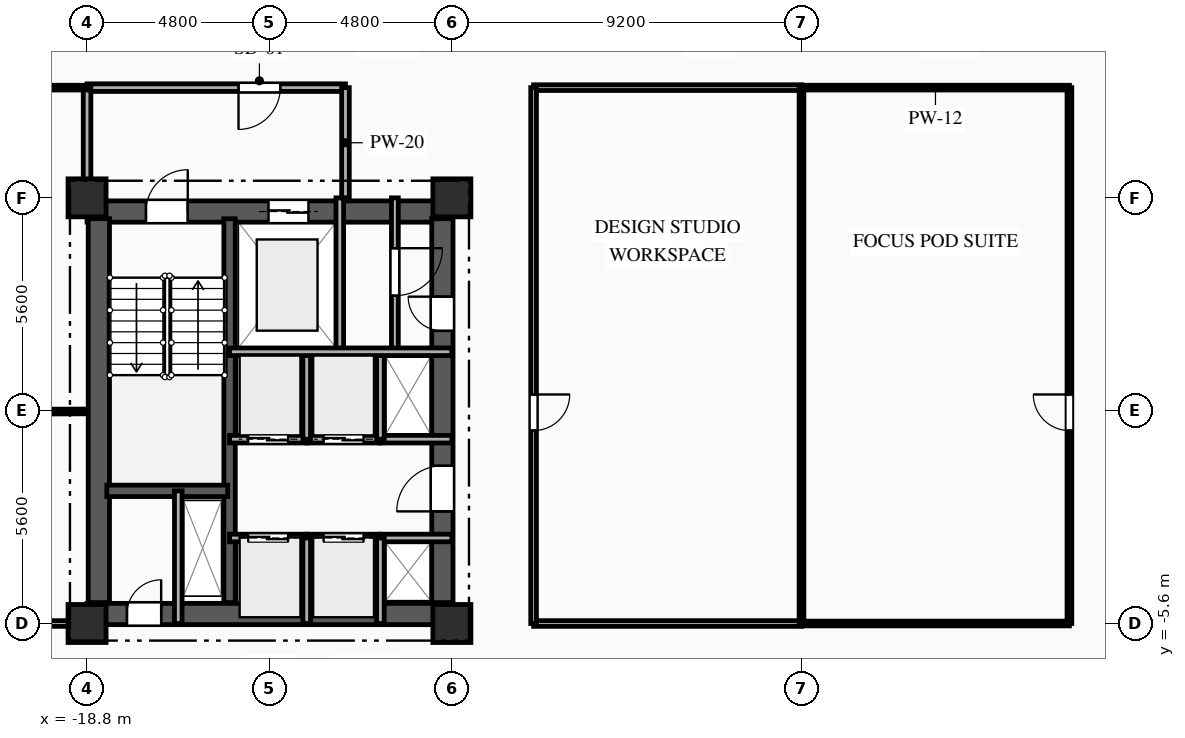
"""IFC4 building model, lengths in metres.
Left out: names, types, materials, properties, quantities, classifications, styles, units other than length and angle.
Written with IfcOpenShell. Run it as: python <this file> out.ifc"""

import sys

from ifc_helpers import new_model, si_unit, direction, frame, frame_2d, origin, origin_2d, place, context, subcontext, project, spatial, rectangle, extrude, element, fill, save


model = new_model("IFC4")
c1 = context("Model", 3, precision=1e-05, world=origin(), true_north=direction((0.0, 1.0)))
c2 = subcontext(c1, "Body", "Model", "MODEL_VIEW")
j1 = project(units=[si_unit("LENGTHUNIT", "METRE"), si_unit("PLANEANGLEUNIT", "RADIAN")], contexts=[c1])
p1 = place(None, origin())
s1 = spatial("IfcSite", under=j1, at=p1, CompositionType="ELEMENT")
p2 = place(p1, origin())
s2 = spatial("IfcBuilding", under=s1, at=p2, CompositionType="ELEMENT")
p3 = place(p2, frame((0.0, 0.0, 109.15)))
s3 = spatial("IfcBuildingStorey", under=s2, at=p3, CompositionType="ELEMENT", Elevation=109.15)
for number, where, z_axis, x_axis in (
    (1, (-18.8, -5.6, 0.0), (0.0, 0.0, 1.0), (1.0, 0.0, 0.0)),
    (2, (-18.8, 5.6, 0.0), (0.0, 0.0, 1.0), (1.0, 0.0, 0.0)),
    (3, (-9.2, -5.6, 0.0), (0.0, 0.0, 1.0), (1.0, 0.0, 0.0)),
    (4, (-9.2, 5.6, 0.0), (0.0, 0.0, 1.0), (1.0, 0.0, 0.0)),
):
    element("IfcColumn", number, at=place(p3, frame(where, z_axis=z_axis, x_axis=x_axis)), inside=s3, PredefinedType="COLUMN", context=c2, shape_type="SweptSolid", body=[
        extrude(rectangle(XDim=1.0, YDim=1.0, at=origin_2d()), origin(), (0.0, 0.0, 1.0), 3.35),
    ])
p4 = place(p3, frame((-18.8, 5.24, 0.0), z_axis=(0.0, 0.0, 1.0), x_axis=(1.0, 0.0, 0.0)))
e5 = element("IfcWall", 5, at=p4, inside=s3, PredefinedType="SHEAR", context=c2, shape_type="SweptSolid", body=[
    extrude(rectangle(XDim=9.6, YDim=0.56, at=frame_2d((4.8, 0.0))), origin(), (0.0, 0.0, 1.0), 3.045),
])
p5 = place(p4, frame((1.55, 0.0, 0.0)))
e6 = element("IfcOpeningElement", 6, at=p5, cuts=e5, PredefinedType="OPENING", context=c2, shape_type="SweptSolid", body=[
    extrude(rectangle(XDim=1.1, YDim=2.15, at=frame_2d((0.55, 1.075))), frame((0.0, 0.29, 0.0), z_axis=(0.0, -1.0, 0.0), x_axis=(1.0, 0.0, 0.0)), (0.0, 0.0, 1.0), 0.58),
])
p6 = place(p4, frame((4.775, 0.0, 0.0)))
e7 = element("IfcOpeningElement", 7, at=p6, cuts=e5, PredefinedType="OPENING", context=c2, shape_type="SweptSolid", body=[
    extrude(rectangle(XDim=1.05, YDim=2.1, at=frame_2d((0.525, 1.05))), frame((0.0, 0.29, 0.0), z_axis=(0.0, -1.0, 0.0), x_axis=(1.0, 0.0, 0.0)), (0.0, 0.0, 1.0), 0.58),
])
p7 = place(p3, frame((-18.8, -5.35, 0.0), z_axis=(0.0, 0.0, 1.0), x_axis=(1.0, 0.0, 0.0)))
e8 = element("IfcWall", 8, at=p7, inside=s3, PredefinedType="SHEAR", context=c2, shape_type="SweptSolid", body=[
    extrude(rectangle(XDim=9.6, YDim=0.56, at=frame_2d((4.8, 0.0))), origin(), (0.0, 0.0, 1.0), 3.045),
])
p8 = place(p7, frame((1.05, 0.0, 0.0)))
e9 = element("IfcOpeningElement", 9, at=p8, cuts=e8, PredefinedType="OPENING", context=c2, shape_type="SweptSolid", body=[
    extrude(rectangle(XDim=0.9, YDim=2.1, at=frame_2d((0.45, 1.05))), frame((0.0, 0.29, 0.0), z_axis=(0.0, -1.0, 0.0), x_axis=(1.0, 0.0, 0.0)), (0.0, 0.0, 1.0), 0.58),
])
p9 = place(p3, frame((-18.49, -5.05, 0.0), z_axis=(0.0, 0.0, 1.0), x_axis=(0.0, 1.0, 0.0)))
e10 = element("IfcWall", 10, at=p9, inside=s3, PredefinedType="SHEAR", context=c2, shape_type="SweptSolid", body=[
    extrude(rectangle(XDim=10.1, YDim=0.56, at=frame_2d((5.05, 0.0))), origin(), (0.0, 0.0, 1.0), 3.045),
])
p10 = place(p3, frame((-9.45, -5.05, 0.0), z_axis=(0.0, 0.0, 1.0), x_axis=(0.0, 1.0, 0.0)))
e11 = element("IfcWall", 11, at=p10, inside=s3, PredefinedType="SHEAR", context=c2, shape_type="SweptSolid", body=[
    extrude(rectangle(XDim=10.1, YDim=0.56, at=frame_2d((5.05, 0.0))), origin(), (0.0, 0.0, 1.0), 3.045),
])
p11 = place(p10, frame((7.15, 0.0, 0.0)))
e12 = element("IfcOpeningElement", 12, at=p11, cuts=e11, PredefinedType="OPENING", context=c2, shape_type="SweptSolid", body=[
    extrude(rectangle(XDim=0.9, YDim=2.1, at=frame_2d((0.45, 1.05))), frame((0.0, 0.29, 0.0), z_axis=(0.0, -1.0, 0.0), x_axis=(1.0, 0.0, 0.0)), (0.0, 0.0, 1.0), 0.58),
])
p12 = place(p10, frame((2.4, 0.0, 0.0)))
e13 = element("IfcOpeningElement", 13, at=p12, cuts=e11, PredefinedType="OPENING", context=c2, shape_type="SweptSolid", body=[
    extrude(rectangle(XDim=1.2, YDim=2.15, at=frame_2d((0.6, 1.075))), frame((0.0, 0.29, 0.0), z_axis=(0.0, -1.0, 0.0), x_axis=(1.0, 0.0, 0.0)), (0.0, 0.0, 1.0), 0.58),
])
p13 = place(p3, frame((-15.05, -5.05, 0.0), z_axis=(0.0, 0.0, 1.0), x_axis=(0.0, 1.0, 0.0)))
e14 = element("IfcWall", 14, at=p13, inside=s3, PredefinedType="SHEAR", context=c2, shape_type="SweptSolid", body=[
    extrude(rectangle(XDim=10.1, YDim=0.3, at=frame_2d((5.05, 0.0))), origin(), (0.0, 0.0, 1.0), 3.045),
])
p14 = place(p3, frame((-18.28, -2.11, 0.0), z_axis=(0.0, 0.0, 1.0), x_axis=(1.0, 0.0, 0.0)))
e15 = element("IfcWall", 15, at=p14, inside=s3, PredefinedType="SHEAR", context=c2, shape_type="SweptSolid", body=[
    extrude(rectangle(XDim=3.18, YDim=0.3, at=frame_2d((1.59, 0.0))), origin(), (0.0, 0.0, 1.0), 3.045),
])
p15 = place(p3, frame((-16.4, -5.6, 0.0), z_axis=(0.0, 0.0, 1.0), x_axis=(0.0, 1.0, 0.0)))
e16 = element("IfcWall", 16, at=p15, inside=s3, PredefinedType="PARTITIONING", context=c2, shape_type="SweptSolid", body=[
    extrude(rectangle(XDim=3.49, YDim=0.2, at=frame_2d((1.745, 0.0))), origin(), (0.0, 0.0, 1.0), 3.045),
])
p16 = place(p3, frame((-12.15, 1.55, 0.0), z_axis=(0.0, 0.0, 1.0), x_axis=(0.0, 1.0, 0.0)))
e17 = element("IfcWall", 17, at=p16, inside=s3, PredefinedType="PARTITIONING", context=c2, shape_type="SweptSolid", body=[
    extrude(rectangle(XDim=4.05, YDim=0.2, at=frame_2d((2.025, 0.0))), origin(), (0.0, 0.0, 1.0), 3.045),
])
p17 = place(p3, frame((-12.0, 8.5, 0.0), z_axis=(0.0, 0.0, 1.0), x_axis=(-1.0, 0.0, 0.0)))
e18 = element("IfcWall", 18, at=p17, inside=s3, PredefinedType="PARTITIONING", context=c2, shape_type="SweptSolid", body=[
    extrude(rectangle(XDim=6.8, YDim=0.2, at=frame_2d((3.4, 0.0))), origin(), (0.0, 0.0, 1.0), 3.045),
])
p18 = place(p17, frame((1.715, 0.0, 0.0)))
e19 = element("IfcOpeningElement", 19, at=p18, cuts=e18, PredefinedType="OPENING", context=c2, shape_type="SweptSolid", body=[
    extrude(rectangle(XDim=1.1, YDim=2.15, at=frame_2d((0.55, 1.075))), frame((0.0, 0.11, 0.0), z_axis=(0.0, -1.0, 0.0), x_axis=(1.0, 0.0, 0.0)), (0.0, 0.0, 1.0), 0.22),
])
p19 = place(p3, frame((-12.0, 5.6, 0.0), z_axis=(0.0, 0.0, 1.0), x_axis=(0.0, 1.0, 0.0)))
e20 = element("IfcWall", 20, at=p19, inside=s3, PredefinedType="PARTITIONING", context=c2, shape_type="SweptSolid", body=[
    extrude(rectangle(XDim=2.9, YDim=0.2, at=frame_2d((1.45, 0.0))), origin(), (0.0, 0.0, 1.0), 3.045),
])
p20 = place(p3, frame((-18.8, 8.5, 0.0), z_axis=(0.0, 0.0, 1.0), x_axis=(0.0, -1.0, 0.0)))
e21 = element("IfcWall", 21, at=p20, inside=s3, PredefinedType="PARTITIONING", context=c2, shape_type="SweptSolid", body=[
    extrude(rectangle(XDim=2.9, YDim=0.2, at=frame_2d((1.45, 0.0))), origin(), (0.0, 0.0, 1.0), 2.53),
])
p21 = place(p3, frame((-10.7, 5.6, 0.0), z_axis=(0.0, 0.0, 1.0), x_axis=(0.0, -1.0, 0.0)))
e22 = element("IfcWall", 22, at=p21, inside=s3, PredefinedType="PARTITIONING", context=c2, shape_type="SweptSolid", body=[
    extrude(rectangle(XDim=4.05, YDim=0.18, at=frame_2d((2.025, 0.0))), origin(), (0.0, 0.0, 1.0), 3.045),
])
p22 = place(p21, frame((1.325, 0.0, 0.0)))
e23 = element("IfcOpeningElement", 23, at=p22, cuts=e22, PredefinedType="OPENING", context=c2, shape_type="SweptSolid", body=[
    extrude(rectangle(XDim=1.25, YDim=2.2, at=frame_2d((0.625, 1.1))), frame((0.0, 0.1, 0.0), z_axis=(0.0, -1.0, 0.0), x_axis=(1.0, 0.0, 0.0)), (0.0, 0.0, 1.0), 0.2),
])
p23 = place(p3, frame((-15.05, -3.35, 0.0), z_axis=(0.0, 0.0, 1.0), x_axis=(1.0, 0.0, 0.0)))
e24 = element("IfcWall", 24, at=p23, inside=s3, PredefinedType="PARTITIONING", context=c2, shape_type="SweptSolid", body=[
    extrude(rectangle(XDim=2.03, YDim=0.2, at=frame_2d((1.015, 0.0))), origin(), (0.0, 0.0, 1.0), 3.045),
])
p24 = place(p23, frame((0.49, 0.0, 0.0)))
e25 = element("IfcOpeningElement", 25, at=p24, cuts=e24, PredefinedType="OPENING", context=c2, shape_type="SweptSolid", body=[
    extrude(rectangle(XDim=1.05, YDim=2.1, at=frame_2d((0.525, 1.05))), frame((0.0, 0.11, 0.0), z_axis=(0.0, -1.0, 0.0), x_axis=(1.0, 0.0, 0.0)), (0.0, 0.0, 1.0), 0.22),
])
p25 = place(p3, frame((-13.02, -3.35, 0.0), z_axis=(0.0, 0.0, 1.0), x_axis=(1.0, 0.0, 0.0)))
e26 = element("IfcWall", 26, at=p25, inside=s3, PredefinedType="PARTITIONING", context=c2, shape_type="SweptSolid", body=[
    extrude(rectangle(XDim=1.94, YDim=0.2, at=frame_2d((0.97, 0.0))), origin(), (0.0, 0.0, 1.0), 3.045),
])
p26 = place(p25, frame((0.445, 0.0, 0.0)))
e27 = element("IfcOpeningElement", 27, at=p26, cuts=e26, PredefinedType="OPENING", context=c2, shape_type="SweptSolid", body=[
    extrude(rectangle(XDim=1.05, YDim=2.1, at=frame_2d((0.525, 1.05))), frame((0.0, 0.11, 0.0), z_axis=(0.0, -1.0, 0.0), x_axis=(1.0, 0.0, 0.0)), (0.0, 0.0, 1.0), 0.22),
])
p27 = place(p3, frame((-11.08, -3.35, 0.0), z_axis=(0.0, 0.0, 1.0), x_axis=(1.0, 0.0, 0.0)))
e28 = element("IfcWall", 28, at=p27, inside=s3, PredefinedType="PARTITIONING", context=c2, shape_type="SweptSolid", body=[
    extrude(rectangle(XDim=1.88, YDim=0.2, at=frame_2d((0.94, 0.0))), origin(), (0.0, 0.0, 1.0), 2.76),
])
p28 = place(p3, frame((-13.02, -0.75, 0.0), z_axis=(0.0, 0.0, 1.0), x_axis=(-1.0, 0.0, 0.0)))
e29 = element("IfcWall", 29, at=p28, inside=s3, PredefinedType="PARTITIONING", context=c2, shape_type="SweptSolid", body=[
    extrude(rectangle(XDim=2.03, YDim=0.2, at=frame_2d((1.015, 0.0))), origin(), (0.0, 0.0, 1.0), 3.045),
])
p29 = place(p28, frame((0.49, 0.0, 0.0)))
e30 = element("IfcOpeningElement", 30, at=p29, cuts=e29, PredefinedType="OPENING", context=c2, shape_type="SweptSolid", body=[
    extrude(rectangle(XDim=1.05, YDim=2.1, at=frame_2d((0.525, 1.05))), frame((0.0, 0.11, 0.0), z_axis=(0.0, -1.0, 0.0), x_axis=(1.0, 0.0, 0.0)), (0.0, 0.0, 1.0), 0.22),
])
p30 = place(p3, frame((-11.08, -0.75, 0.0), z_axis=(0.0, 0.0, 1.0), x_axis=(-1.0, 0.0, 0.0)))
e31 = element("IfcWall", 31, at=p30, inside=s3, PredefinedType="PARTITIONING", context=c2, shape_type="SweptSolid", body=[
    extrude(rectangle(XDim=1.94, YDim=0.2, at=frame_2d((0.97, 0.0))), origin(), (0.0, 0.0, 1.0), 3.045),
])
p31 = place(p30, frame((0.445, 0.0, 0.0)))
e32 = element("IfcOpeningElement", 32, at=p31, cuts=e31, PredefinedType="OPENING", context=c2, shape_type="SweptSolid", body=[
    extrude(rectangle(XDim=1.05, YDim=2.1, at=frame_2d((0.525, 1.05))), frame((0.0, 0.11, 0.0), z_axis=(0.0, -1.0, 0.0), x_axis=(1.0, 0.0, 0.0)), (0.0, 0.0, 1.0), 0.22),
])
p32 = place(p3, frame((-9.2, -0.75, 0.0), z_axis=(0.0, 0.0, 1.0), x_axis=(-1.0, 0.0, 0.0)))
e33 = element("IfcWall", 33, at=p32, inside=s3, PredefinedType="PARTITIONING", context=c2, shape_type="SweptSolid", body=[
    extrude(rectangle(XDim=1.88, YDim=0.2, at=frame_2d((0.94, 0.0))), origin(), (0.0, 0.0, 1.0), 3.045),
])
for number, where, z_axis, x_axis in (
    (34, (-13.02, -5.6, 0.0), (0.0, 0.0, 1.0), (0.0, 1.0, 0.0)),
    (35, (-11.08, -5.6, 0.0), (0.0, 0.0, 1.0), (0.0, 1.0, 0.0)),
):
    element("IfcWall", number, at=place(p3, frame(where, z_axis=z_axis, x_axis=x_axis)), inside=s3, PredefinedType="PARTITIONING", context=c2, shape_type="SweptSolid", body=[
        extrude(rectangle(XDim=2.25, YDim=0.2, at=frame_2d((1.125, 0.0))), origin(), (0.0, 0.0, 1.0), 3.045),
    ])
for number, where, z_axis, x_axis in (
    (36, (-13.02, -0.75, 0.0), (0.0, 0.0, 1.0), (0.0, 1.0, 0.0)),
    (37, (-11.08, -0.75, 0.0), (0.0, 0.0, 1.0), (0.0, 1.0, 0.0)),
):
    element("IfcWall", number, at=place(p3, frame(where, z_axis=z_axis, x_axis=x_axis)), inside=s3, PredefinedType="PARTITIONING", context=c2, shape_type="SweptSolid", body=[
        extrude(rectangle(XDim=2.3, YDim=0.2, at=frame_2d((1.15, 0.0))), origin(), (0.0, 0.0, 1.0), 3.045),
    ])
p33 = place(p3, frame((-18.8, 8.5, 0.0), z_axis=(0.0, 0.0, 1.0), x_axis=(-1.0, 0.0, 0.0)))
e38 = element("IfcWall", 38, at=p33, inside=s3, PredefinedType="PARTITIONING", context=c2, shape_type="SweptSolid", body=[
    extrude(rectangle(XDim=4.2, YDim=0.125, at=frame_2d((2.1, 0.0))), origin(), (0.0, 0.0, 1.0), 3.045),
])
p34 = place(p33, frame((2.409, 0.0, 0.0)))
e39 = element("IfcOpeningElement", 39, at=p34, cuts=e38, PredefinedType="OPENING", context=c2, shape_type="SweptSolid", body=[
    extrude(rectangle(XDim=0.95, YDim=2.1, at=frame_2d((0.475, 1.05))), frame((0.0, 0.073, 0.0), z_axis=(0.0, -1.0, 0.0), x_axis=(1.0, 0.0, 0.0)), (0.0, 0.0, 1.0), 0.145),
])
p35 = place(p3, frame((0.0, 8.5, 0.0), z_axis=(0.0, 0.0, 1.0), x_axis=(-1.0, 0.0, 0.0)))
e40 = element("IfcWall", 40, at=p35, inside=s3, PredefinedType="PARTITIONING", context=c2, shape_type="SweptSolid", body=[
    extrude(rectangle(XDim=7.05, YDim=0.15, at=frame_2d((3.525, 0.0))), origin(), (0.0, 0.0, 1.0), 3.045),
])
p36 = place(p3, frame((7.05, 8.5, 0.0), z_axis=(0.0, 0.0, 1.0), x_axis=(-1.0, 0.0, 0.0)))
e41 = element("IfcWall", 41, at=p36, inside=s3, PredefinedType="PARTITIONING", context=c2, shape_type="SweptSolid", body=[
    extrude(rectangle(XDim=7.05, YDim=0.125, at=frame_2d((3.525, 0.0))), origin(), (0.0, 0.0, 1.0), 3.045),
])
p37 = place(p3, frame((-23.0, -5.6, 0.0), z_axis=(0.0, 0.0, 1.0), x_axis=(1.0, 0.0, 0.0)))
e42 = element("IfcWall", 42, at=p37, inside=s3, PredefinedType="PARTITIONING", context=c2, shape_type="SweptSolid", body=[
    extrude(rectangle(XDim=4.2, YDim=0.15, at=frame_2d((2.1, 0.0))), origin(), (0.0, 0.0, 1.0), 3.045),
])
p38 = place(p37, frame((0.829, 0.0, 0.0)))
e43 = element("IfcOpeningElement", 43, at=p38, cuts=e42, PredefinedType="OPENING", context=c2, shape_type="SweptSolid", body=[
    extrude(rectangle(XDim=1.05, YDim=2.15, at=frame_2d((0.525, 1.075))), frame((0.0, 0.085, 0.0), z_axis=(0.0, -1.0, 0.0), x_axis=(1.0, 0.0, 0.0)), (0.0, 0.0, 1.0), 0.17),
])
p39 = place(p3, frame((-7.05, -5.6, 0.0), z_axis=(0.0, 0.0, 1.0), x_axis=(1.0, 0.0, 0.0)))
e44 = element("IfcWall", 44, at=p39, inside=s3, PredefinedType="PARTITIONING", context=c2, shape_type="SweptSolid", body=[
    extrude(rectangle(XDim=7.05, YDim=0.15, at=frame_2d((3.525, 0.0))), origin(), (0.0, 0.0, 1.0), 2.53),
])
p40 = place(p3, frame((0.0, -5.6, 0.0), z_axis=(0.0, 0.0, 1.0), x_axis=(1.0, 0.0, 0.0)))
e45 = element("IfcWall", 45, at=p40, inside=s3, PredefinedType="PARTITIONING", context=c2, shape_type="SweptSolid", body=[
    extrude(rectangle(XDim=7.05, YDim=0.125, at=frame_2d((3.525, 0.0))), origin(), (0.0, 0.0, 1.0), 2.53),
])
p41 = place(p3, frame((-7.05, 8.5, 0.0), z_axis=(0.0, 0.0, 1.0), x_axis=(0.0, -1.0, 0.0)))
e46 = element("IfcWall", 46, at=p41, inside=s3, PredefinedType="PARTITIONING", context=c2, shape_type="SweptSolid", body=[
    extrude(rectangle(XDim=14.1, YDim=0.15, at=frame_2d((7.05, 0.0))), origin(), (0.0, 0.0, 1.0), 3.045),
])
p42 = place(p41, frame((8.074, 0.0, 0.0)))
e47 = element("IfcOpeningElement", 47, at=p42, cuts=e46, PredefinedType="OPENING", context=c2, shape_type="SweptSolid", body=[
    extrude(rectangle(XDim=0.95, YDim=2.1, at=frame_2d((0.475, 1.05))), frame((0.0, 0.085, 0.0), z_axis=(0.0, -1.0, 0.0), x_axis=(1.0, 0.0, 0.0)), (0.0, 0.0, 1.0), 0.17),
])
p43 = place(p3, frame((7.05, -5.6, 0.0), z_axis=(0.0, 0.0, 1.0), x_axis=(0.0, 1.0, 0.0)))
e48 = element("IfcWall", 48, at=p43, inside=s3, PredefinedType="PARTITIONING", context=c2, shape_type="SweptSolid", body=[
    extrude(rectangle(XDim=14.1, YDim=0.125, at=frame_2d((7.05, 0.0))), origin(), (0.0, 0.0, 1.0), 3.045),
])
p44 = place(p43, frame((5.076, 0.0, 0.0)))
e49 = element("IfcOpeningElement", 49, at=p44, cuts=e48, PredefinedType="OPENING", context=c2, shape_type="SweptSolid", body=[
    extrude(rectangle(XDim=0.95, YDim=2.1, at=frame_2d((0.475, 1.05))), frame((0.0, 0.073, 0.0), z_axis=(0.0, -1.0, 0.0), x_axis=(1.0, 0.0, 0.0)), (0.0, 0.0, 1.0), 0.145),
])
p45 = place(p3, frame((-28.671, -0.064, 0.0), z_axis=(0.0, 0.0, 1.0), x_axis=(0.999990089865, 0.004451985263, 0.0)))
e50 = element("IfcWall", 50, at=p45, inside=s3, PredefinedType="PARTITIONING", context=c2, shape_type="SweptSolid", body=[
    extrude(rectangle(XDim=9.871, YDim=0.125, at=frame_2d((4.936, 0.0))), origin(), (0.0, 0.0, 1.0), 3.045),
])
p46 = place(p3, frame((0.0, 8.5, 0.0), z_axis=(0.0, 0.0, 1.0), x_axis=(0.0, -1.0, 0.0)))
e51 = element("IfcWall", 51, at=p46, inside=s3, PredefinedType="PARTITIONING", context=c2, shape_type="SweptSolid", body=[
    extrude(rectangle(XDim=14.1, YDim=0.125, at=frame_2d((7.05, 0.0))), origin(), (0.0, 0.0, 1.0), 3.045),
])
p47 = place(p3, frame((-15.05, 1.55, 0.0), z_axis=(0.0, 0.0, 1.0), x_axis=(1.0, 0.0, 0.0)))
e52 = element("IfcWall", 52, at=p47, inside=s3, PredefinedType="PARTITIONING", context=c2, shape_type="SweptSolid", body=[
    extrude(rectangle(XDim=5.85, YDim=0.2, at=frame_2d((2.925, 0.0))), origin(), (0.0, 0.0, 1.0), 3.045),
])
p48 = place(p5, origin())
e53 = element("IfcDoor", 53, at=p48, inside=s3, OperationType="SINGLE_SWING_RIGHT", PredefinedType="DOOR", context=c2, shape_type="SweptSolid", body=[
    extrude(rectangle(XDim=1.1, YDim=2.15, at=frame_2d((0.55, 1.075))), frame((0.0, 0.025, 0.0), z_axis=(0.0, -1.0, 0.0), x_axis=(1.0, 0.0, 0.0)), (0.0, 0.0, 1.0), 0.05),
])
fill(e6, e53)
p49 = place(p6, origin())
e54 = element("IfcDoor", 54, at=p49, inside=s3, OperationType="DOUBLE_DOOR_SLIDING", PredefinedType="DOOR", context=c2, shape_type="SweptSolid", body=[
    extrude(rectangle(XDim=1.05, YDim=2.1, at=frame_2d((0.525, 1.05))), frame((0.0, 0.025, 0.0), z_axis=(0.0, -1.0, 0.0), x_axis=(1.0, 0.0, 0.0)), (0.0, 0.0, 1.0), 0.05),
])
fill(e7, e54)
p50 = place(p8, origin())
e55 = element("IfcDoor", 55, at=p50, inside=s3, OperationType="SINGLE_SWING_RIGHT", PredefinedType="DOOR", context=c2, shape_type="SweptSolid", body=[
    extrude(rectangle(XDim=0.9, YDim=2.1, at=frame_2d((0.45, 1.05))), frame((0.0, 0.025, 0.0), z_axis=(0.0, -1.0, 0.0), x_axis=(1.0, 0.0, 0.0)), (0.0, 0.0, 1.0), 0.05),
])
fill(e9, e55)
p51 = place(p18, origin())
e56 = element("IfcDoor", 56, at=p51, inside=s3, OperationType="SINGLE_SWING_RIGHT", PredefinedType="DOOR", context=c2, shape_type="SweptSolid", body=[
    extrude(rectangle(XDim=1.1, YDim=2.15, at=frame_2d((0.55, 1.075))), frame((0.0, 0.025, 0.0), z_axis=(0.0, -1.0, 0.0), x_axis=(1.0, 0.0, 0.0)), (0.0, 0.0, 1.0), 0.05),
])
fill(e19, e56)
p52 = place(p22, origin())
e57 = element("IfcDoor", 57, at=p52, inside=s3, OperationType="SINGLE_SWING_LEFT", PredefinedType="DOOR", context=c2, shape_type="SweptSolid", body=[
    extrude(rectangle(XDim=1.25, YDim=2.2, at=frame_2d((0.625, 1.1))), frame((0.0, 0.025, 0.0), z_axis=(0.0, -1.0, 0.0), x_axis=(1.0, 0.0, 0.0)), (0.0, 0.0, 1.0), 0.05),
])
fill(e23, e57)
p53 = place(p11, origin())
e58 = element("IfcDoor", 58, at=p53, inside=s3, OperationType="SINGLE_SWING_RIGHT", PredefinedType="DOOR", context=c2, shape_type="SweptSolid", body=[
    extrude(rectangle(XDim=0.9, YDim=2.1, at=frame_2d((0.45, 1.05))), frame((0.0, 0.025, 0.0), z_axis=(0.0, -1.0, 0.0), x_axis=(1.0, 0.0, 0.0)), (0.0, 0.0, 1.0), 0.05),
])
fill(e12, e58)
p54 = place(p24, origin())
e59 = element("IfcDoor", 59, at=p54, inside=s3, OperationType="DOUBLE_DOOR_SLIDING", PredefinedType="DOOR", context=c2, shape_type="SweptSolid", body=[
    extrude(rectangle(XDim=1.05, YDim=2.1, at=frame_2d((0.525, 1.05))), frame((0.0, 0.025, 0.0), z_axis=(0.0, -1.0, 0.0), x_axis=(1.0, 0.0, 0.0)), (0.0, 0.0, 1.0), 0.05),
])
fill(e25, e59)
p55 = place(p26, origin())
e60 = element("IfcDoor", 60, at=p55, inside=s3, OperationType="DOUBLE_DOOR_SLIDING", PredefinedType="DOOR", context=c2, shape_type="SweptSolid", body=[
    extrude(rectangle(XDim=1.05, YDim=2.1, at=frame_2d((0.525, 1.05))), frame((0.0, 0.025, 0.0), z_axis=(0.0, -1.0, 0.0), x_axis=(1.0, 0.0, 0.0)), (0.0, 0.0, 1.0), 0.05),
])
fill(e27, e60)
p56 = place(p29, origin())
e61 = element("IfcDoor", 61, at=p56, inside=s3, OperationType="DOUBLE_DOOR_SLIDING", PredefinedType="DOOR", context=c2, shape_type="SweptSolid", body=[
    extrude(rectangle(XDim=1.05, YDim=2.1, at=frame_2d((0.525, 1.05))), frame((0.0, 0.025, 0.0), z_axis=(0.0, -1.0, 0.0), x_axis=(1.0, 0.0, 0.0)), (0.0, 0.0, 1.0), 0.05),
])
fill(e30, e61)
p57 = place(p31, origin())
e62 = element("IfcDoor", 62, at=p57, inside=s3, OperationType="DOUBLE_DOOR_SLIDING", PredefinedType="DOOR", context=c2, shape_type="SweptSolid", body=[
    extrude(rectangle(XDim=1.05, YDim=2.1, at=frame_2d((0.525, 1.05))), frame((0.0, 0.025, 0.0), z_axis=(0.0, -1.0, 0.0), x_axis=(1.0, 0.0, 0.0)), (0.0, 0.0, 1.0), 0.05),
])
fill(e32, e62)
p58 = place(p12, origin())
e63 = element("IfcDoor", 63, at=p58, inside=s3, OperationType="SINGLE_SWING_LEFT", PredefinedType="DOOR", context=c2, shape_type="SweptSolid", body=[
    extrude(rectangle(XDim=1.2, YDim=2.15, at=frame_2d((0.6, 1.075))), frame((0.0, 0.025, 0.0), z_axis=(0.0, -1.0, 0.0), x_axis=(1.0, 0.0, 0.0)), (0.0, 0.0, 1.0), 0.05),
])
fill(e13, e63)
p59 = place(p42, origin())
e64 = element("IfcDoor", 64, at=p59, inside=s3, OperationType="SINGLE_SWING_LEFT", PredefinedType="DOOR", context=c2, shape_type="SweptSolid", body=[
    extrude(rectangle(XDim=0.95, YDim=2.1, at=frame_2d((0.475, 1.05))), frame((0.0, 0.025, 0.0), z_axis=(0.0, -1.0, 0.0), x_axis=(1.0, 0.0, 0.0)), (0.0, 0.0, 1.0), 0.05),
])
fill(e47, e64)
p60 = place(p44, origin())
e65 = element("IfcDoor", 65, at=p60, inside=s3, OperationType="SINGLE_SWING_RIGHT", PredefinedType="DOOR", context=c2, shape_type="SweptSolid", body=[
    extrude(rectangle(XDim=0.95, YDim=2.1, at=frame_2d((0.475, 1.05))), frame((0.0, 0.025, 0.0), z_axis=(0.0, -1.0, 0.0), x_axis=(1.0, 0.0, 0.0)), (0.0, 0.0, 1.0), 0.05),
])
fill(e49, e65)
save(model, sys.argv[1])
